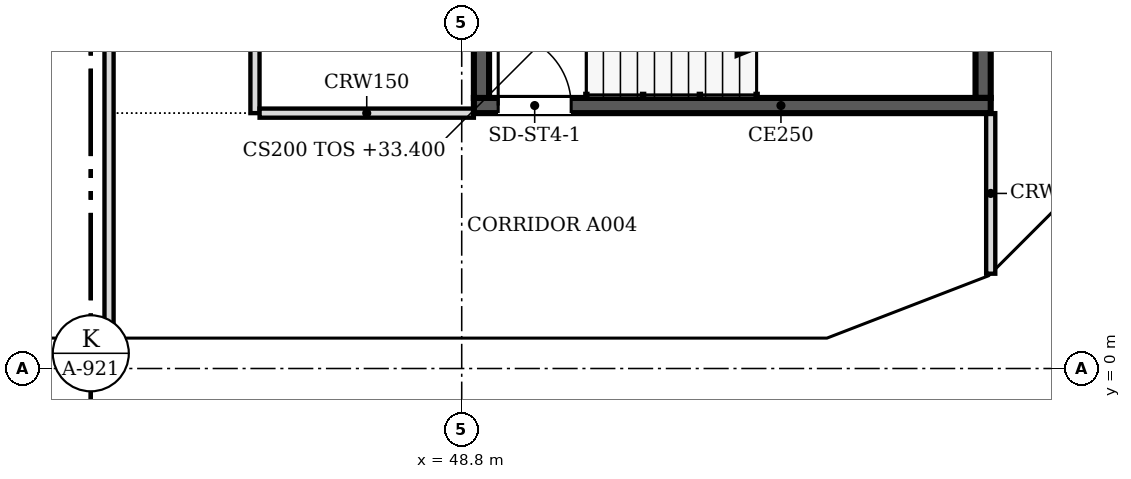
"""IFC4 building model, lengths in metres.
Left out: names, types, materials, properties, quantities, classifications, styles, units other than length and angle.
Written with IfcOpenShell. Run it as: python <this file> out.ifc"""

import sys

from ifc_helpers import new_model, si_unit, direction, frame, frame_2d, origin, place, context, subcontext, project, spatial, polyline, rectangle, outline, extrude, faceted_brep, source, transform, mapped, element, fill, save


model = new_model("IFC4")
c1 = context("Model", 3, precision=1e-05, world=origin(), true_north=direction((0.0, 1.0)))
c2 = subcontext(c1, "Body", "Model", "MODEL_VIEW")
j1 = project(units=[si_unit("LENGTHUNIT", "METRE"), si_unit("PLANEANGLEUNIT", "RADIAN")], contexts=[c1])
p1 = place(None, origin())
s1 = spatial("IfcSite", under=j1, at=p1, CompositionType="ELEMENT")
p2 = place(p1, origin())
s2 = spatial("IfcBuilding", under=s1, at=p2, CompositionType="ELEMENT")
p3 = place(p2, frame((0.0, 0.0, 33.4)))
s3 = spatial("IfcBuildingStorey", under=s2, at=p3, CompositionType="ELEMENT", Elevation=33.4)
m1 = source(origin(), c2, "Body", "SweptSolid", [
    extrude(outline(polyline([(3.05, 0.0), (6.1, 3.8), (3.05, 7.6), (0.0, 3.8), (3.05, 0.0)])), frame((0.0, 0.25, 0.0), z_axis=(0.0, -1.0, 0.0), x_axis=(1.0, 0.0, 0.0)), (0.0, 0.0, 1.0), 0.5),
])
p4 = place(p3, frame((39.65, 0.25, -3.8), z_axis=(0.0, 0.0, 1.0), x_axis=(1.0, 0.0, 0.0)))
e1 = element("IfcWall", 1, at=p4, inside=s3, PredefinedType="SOLIDWALL", context=c2, shape_type="MappedRepresentation", body=[
    mapped(m1, transform((0.0, 0.0, 0.0), scale=1.0)),
])
m2 = source(origin(), c2, "Body", "SweptSolid", [
    extrude(outline(polyline([(3.05, 0.399), (5.78, 3.8), (3.05, 7.2), (0.321, 3.8), (3.05, 0.399)])), frame((0.0, 0.26, 0.0), z_axis=(0.0, -1.0, 0.0), x_axis=(1.0, 0.0, 0.0)), (0.0, 0.0, 1.0), 0.52),
])
p5 = place(p4, origin())
e2 = element("IfcOpeningElement", 2, at=p5, cuts=e1, PredefinedType="OPENING", context=c2, shape_type="MappedRepresentation", body=[
    mapped(m2, transform((0.0, 0.0, 0.0), scale=1.0)),
])
p6 = place(p3, frame((45.75, 0.25, -3.8), z_axis=(0.0, 0.0, 1.0), x_axis=(1.0, 0.0, 0.0)))
e3 = element("IfcWall", 3, at=p6, inside=s3, PredefinedType="SOLIDWALL", context=c2, shape_type="MappedRepresentation", body=[
    mapped(m1, transform((0.0, 0.0, 0.0), scale=1.0)),
])
p7 = place(p6, origin())
e4 = element("IfcOpeningElement", 4, at=p7, cuts=e3, PredefinedType="OPENING", context=c2, shape_type="MappedRepresentation", body=[
    mapped(m2, transform((0.0, 0.0, 0.0), scale=1.0)),
])
m3 = source(origin(), c2, "Body", "Brep", [
    faceted_brep([(3.003, -0.25, 0.0), (3.05, -0.25, 0.06), (3.05, -0.25, 7.54), (3.003, -0.25, 7.6), (0.0, -0.25, 3.8), (0.0, 0.25, 3.8), (2.957, 0.25, 7.541), (2.957, 0.25, 0.059), (3.003, 0.0, 0.0), (3.003, 0.0, 7.6)], [[[0, 1, 2, 3, 4]], [[5, 6, 7]], [[1, 0, 8]], [[9, 3, 2]], [[6, 5, 4, 3, 9]], [[5, 7, 8, 0, 4]], [[1, 8, 7, 6, 9, 2]]]),
])
p8 = place(p3, frame((51.85, 0.25, -3.8), z_axis=(0.0, 0.0, 1.0), x_axis=(1.0, 0.0, 0.0)))
e5 = element("IfcWall", 5, at=p8, inside=s3, PredefinedType="SOLIDWALL", context=c2, shape_type="MappedRepresentation", body=[
    mapped(m3, transform((0.0, 0.0, 0.0), scale=1.0)),
])
m4 = source(origin(), c2, "Body", "SweptSolid", [
    extrude(outline(polyline([(2.803, 6.944), (0.319, 3.8), (2.803, 0.656), (2.803, 6.944)])), frame((0.0, 0.26, 0.0), z_axis=(0.0, -1.0, 0.0), x_axis=(1.0, 0.0, 0.0)), (0.0, 0.0, 1.0), 0.52),
])
p9 = place(p8, origin())
e6 = element("IfcOpeningElement", 6, at=p9, cuts=e5, PredefinedType="OPENING", context=c2, shape_type="MappedRepresentation", body=[
    mapped(m4, transform((0.0, 0.0, 0.0), scale=1.0)),
])
m5 = source(origin(), c2, "Body", "Brep", [
    faceted_brep([(0.047, -0.25, 0.0), (2.997, -0.25, 3.8), (0.047, -0.25, 7.6), (0.0, -0.25, 7.541), (0.0, -0.25, 0.059), (0.093, 0.25, 7.54), (2.944, 0.25, 3.868), (2.944, 0.25, 3.732), (0.093, 0.25, 0.06), (2.997, 0.0, 3.8), (0.047, 0.0, 0.0), (0.047, 0.0, 7.6)], [[[0, 1, 2, 3, 4]], [[5, 6, 7, 8]], [[8, 7, 9, 1, 0, 10]], [[6, 5, 11, 2, 1, 9]], [[3, 2, 11]], [[10, 0, 4]], [[8, 10, 4, 3, 11, 5]], [[9, 7, 6]]]),
])
p10 = place(p3, frame((54.81, 0.233, -3.8), z_axis=(0.0, 0.0, 1.0), x_axis=(0.932990326376, 0.359901446078, 0.0)))
e7 = element("IfcWall", 7, at=p10, inside=s3, PredefinedType="SOLIDWALL", context=c2, shape_type="MappedRepresentation", body=[
    mapped(m5, transform((0.0, 0.0, 0.0), scale=1.0)),
])
m6 = source(origin(), c2, "Body", "SweptSolid", [
    extrude(outline(polyline([(0.247, 0.665), (2.681, 3.8), (0.247, 6.935), (0.247, 0.665)])), frame((0.0, 0.26, 0.0), z_axis=(0.0, -1.0, 0.0), x_axis=(1.0, 0.0, 0.0)), (0.0, 0.0, 1.0), 0.52),
])
p11 = place(p10, origin())
e8 = element("IfcOpeningElement", 8, at=p11, cuts=e7, PredefinedType="OPENING", context=c2, shape_type="MappedRepresentation", body=[
    mapped(m6, transform((0.0, 0.0, 0.0), scale=1.0)),
])
m7 = source(origin(), c2, "Body", "Brep", [
    faceted_brep([(2.944, -0.25, 0.0), (2.997, -0.25, 0.068), (2.997, -0.25, 7.532), (2.944, -0.25, 7.6), (0.0, -0.25, 3.8), (0.053, 0.25, 3.868), (2.891, 0.25, 7.532), (2.891, 0.25, 0.068), (0.053, 0.25, 3.731), (2.944, 0.0, 0.0), (2.944, 0.0, 7.6), (0.0, 0.0, 3.8)], [[[0, 1, 2, 3, 4]], [[5, 6, 7, 8]], [[1, 0, 9]], [[10, 3, 2]], [[6, 5, 11, 4, 3, 10]], [[8, 7, 9, 0, 4, 11]], [[8, 11, 5]], [[1, 9, 7, 6, 10, 2]]]),
])
p12 = place(p3, frame((57.606, 1.312, -3.8), z_axis=(0.0, 0.0, 1.0), x_axis=(0.707147509625, 0.707066050402, 0.0)))
e9 = element("IfcWall", 9, at=p12, inside=s3, PredefinedType="SOLIDWALL", context=c2, shape_type="MappedRepresentation", body=[
    mapped(m7, transform((0.0, 0.0, 0.0), scale=1.0)),
])
m8 = source(origin(), c2, "Body", "SweptSolid", [
    extrude(outline(polyline([(2.744, 6.934), (0.316, 3.8), (2.744, 0.666), (2.744, 6.934)])), frame((0.0, 0.26, 0.0), z_axis=(0.0, -1.0, 0.0), x_axis=(1.0, 0.0, 0.0)), (0.0, 0.0, 1.0), 0.52),
])
p13 = place(p12, origin())
e10 = element("IfcOpeningElement", 10, at=p13, cuts=e9, PredefinedType="OPENING", context=c2, shape_type="MappedRepresentation", body=[
    mapped(m8, transform((0.0, 0.0, 0.0), scale=1.0)),
])
p14 = place(p2, frame((0.0, 0.0, 37.2)))
s4 = spatial("IfcBuildingStorey", under=s2, at=p14, CompositionType="ELEMENT", Elevation=37.2)
m9 = source(origin(), c2, "Body", "Brep", [
    faceted_brep([(3.05, -0.25, 0.0), (6.1, -0.25, 3.8), (6.1, -0.25, 3.8), (3.05, -0.25, 7.6), (0.0, -0.25, 3.8), (0.0, 0.25, 3.8), (3.05, 0.25, 7.6), (6.1, 0.25, 3.8), (6.1, 0.25, 3.8), (3.05, 0.25, 0.0)], [[[0, 1, 2, 3, 4]], [[5, 6, 7, 8, 9]], [[9, 8, 1, 0]], [[7, 6, 3, 2]], [[6, 5, 4, 3]], [[5, 9, 0, 4]], [[1, 8, 7, 2]]]),
])
p15 = place(p14, frame((36.6, 0.25, -3.8), z_axis=(0.0, 0.0, 1.0), x_axis=(1.0, 0.0, 0.0)))
e11 = element("IfcWall", 11, at=p15, inside=s4, PredefinedType="SOLIDWALL", context=c2, shape_type="MappedRepresentation", body=[
    mapped(m9, transform((0.0, 0.0, 0.0), scale=1.0)),
])
m10 = source(origin(), c2, "Body", "SweptSolid", [
    extrude(outline(polyline([(3.05, 0.399), (5.78, 3.8), (3.05, 7.201), (0.321, 3.8), (3.05, 0.399)])), frame((0.0, 0.26, 0.0), z_axis=(0.0, -1.0, 0.0), x_axis=(1.0, 0.0, 0.0)), (0.0, 0.0, 1.0), 0.52),
])
p16 = place(p15, origin())
e12 = element("IfcOpeningElement", 12, at=p16, cuts=e11, PredefinedType="OPENING", context=c2, shape_type="MappedRepresentation", body=[
    mapped(m10, transform((0.0, 0.0, 0.0), scale=1.0)),
])
m11 = source(origin(), c2, "Body", "SweptSolid", [
    extrude(outline(polyline([(3.05, 0.0), (6.1, 3.8), (3.05, 7.6), (0.0, 3.8), (3.05, 0.0)])), frame((0.0, 0.25, 0.0), z_axis=(0.0, -1.0, 0.0), x_axis=(1.0, 0.0, 0.0)), (0.0, 0.0, 1.0), 0.5),
])
p17 = place(p14, frame((42.7, 0.25, -3.8), z_axis=(0.0, 0.0, 1.0), x_axis=(1.0, 0.0, 0.0)))
e13 = element("IfcWall", 13, at=p17, inside=s4, PredefinedType="SOLIDWALL", context=c2, shape_type="MappedRepresentation", body=[
    mapped(m11, transform((0.0, 0.0, 0.0), scale=1.0)),
])
p18 = place(p17, origin())
e14 = element("IfcOpeningElement", 14, at=p18, cuts=e13, PredefinedType="OPENING", context=c2, shape_type="MappedRepresentation", body=[
    mapped(m10, transform((0.0, 0.0, 0.0), scale=1.0)),
])
m12 = source(origin(), c2, "Body", "Brep", [
    faceted_brep([(3.05, -0.25, 0.0), (6.053, -0.25, 3.8), (3.05, -0.25, 7.6), (0.0, -0.25, 3.8), (0.0, 0.25, 3.8), (3.05, 0.25, 7.6), (6.007, 0.25, 3.859), (6.007, 0.25, 3.741), (3.05, 0.25, 0.0), (6.053, 0.0, 3.8)], [[[0, 1, 2, 3]], [[4, 5, 6, 7, 8]], [[8, 7, 9, 1, 0]], [[6, 5, 2, 1, 9]], [[5, 4, 3, 2]], [[4, 8, 0, 3]], [[9, 7, 6]]]),
])
p19 = place(p14, frame((48.8, 0.25, -3.8), z_axis=(0.0, 0.0, 1.0), x_axis=(1.0, 0.0, 0.0)))
e15 = element("IfcWall", 15, at=p19, inside=s4, PredefinedType="SOLIDWALL", context=c2, shape_type="MappedRepresentation", body=[
    mapped(m12, transform((0.0, 0.0, 0.0), scale=1.0)),
])
m13 = source(origin(), c2, "Body", "SweptSolid", [
    extrude(outline(polyline([(3.049, 0.401), (5.735, 3.8), (3.049, 7.199), (0.321, 3.8), (3.049, 0.401)])), frame((0.0, 0.26, 0.0), z_axis=(0.0, -1.0, 0.0), x_axis=(1.0, 0.0, 0.0)), (0.0, 0.0, 1.0), 0.52),
])
p20 = place(p19, origin())
e16 = element("IfcOpeningElement", 16, at=p20, cuts=e15, PredefinedType="OPENING", context=c2, shape_type="MappedRepresentation", body=[
    mapped(m13, transform((0.0, 0.0, 0.0), scale=1.0)),
])
m14 = source(origin(), c2, "Body", "Brep", [
    faceted_brep([(2.95, -0.25, 0.0), (3.003, -0.25, 0.068), (3.003, -0.25, 7.532), (2.95, -0.25, 7.6), (0.0, -0.25, 3.8), (0.047, 0.25, 3.86), (2.898, 0.25, 7.532), (2.898, 0.25, 0.068), (0.047, 0.25, 3.74), (2.95, 0.0, 0.0), (2.95, 0.0, 7.6), (0.0, 0.0, 3.8)], [[[0, 1, 2, 3, 4]], [[5, 6, 7, 8]], [[1, 0, 9]], [[10, 3, 2]], [[6, 5, 11, 4, 3, 10]], [[8, 7, 9, 0, 4, 11]], [[8, 11, 5]], [[1, 9, 7, 6, 10, 2]]]),
])
p21 = place(p14, frame((54.854, 0.25, -3.8), z_axis=(0.0, 0.0, 1.0), x_axis=(0.932970071518, 0.359953949349, 0.0)))
e17 = element("IfcWall", 17, at=p21, inside=s4, PredefinedType="SOLIDWALL", context=c2, shape_type="MappedRepresentation", body=[
    mapped(m14, transform((0.0, 0.0, 0.0), scale=1.0)),
])
m15 = source(origin(), c2, "Body", "SweptSolid", [
    extrude(outline(polyline([(2.75, 6.935), (0.316, 3.8), (2.75, 0.665), (2.75, 6.935)])), frame((0.0, 0.26, 0.0), z_axis=(0.0, -1.0, 0.0), x_axis=(1.0, 0.0, 0.0)), (0.0, 0.0, 1.0), 0.52),
])
p22 = place(p21, origin())
e18 = element("IfcOpeningElement", 18, at=p22, cuts=e17, PredefinedType="OPENING", context=c2, shape_type="MappedRepresentation", body=[
    mapped(m15, transform((0.0, 0.0, 0.0), scale=1.0)),
])
m16 = source(origin(), c2, "Body", "Brep", [
    faceted_brep([(0.053, -0.25, 0.0), (2.997, -0.25, 3.8), (0.053, -0.25, 7.6), (0.0, -0.25, 7.532), (0.0, -0.25, 0.068), (0.106, 0.25, 7.532), (2.944, 0.25, 3.868), (2.944, 0.25, 3.732), (0.106, 0.25, 0.068), (2.997, 0.0, 3.8), (0.053, 0.0, 0.0), (0.053, 0.0, 7.6)], [[[0, 1, 2, 3, 4]], [[5, 6, 7, 8]], [[8, 7, 9, 1, 0, 10]], [[6, 5, 11, 2, 1, 9]], [[3, 2, 11]], [[10, 0, 4]], [[8, 10, 4, 3, 11, 5]], [[9, 7, 6]]]),
])
p23 = place(p14, frame((57.569, 1.274, -3.8), z_axis=(0.0, 0.0, 1.0), x_axis=(0.707066050402, 0.707147509625, 0.0)))
e19 = element("IfcWall", 19, at=p23, inside=s4, PredefinedType="SOLIDWALL", context=c2, shape_type="MappedRepresentation", body=[
    mapped(m16, transform((0.0, 0.0, 0.0), scale=1.0)),
])
m17 = source(origin(), c2, "Body", "SweptSolid", [
    extrude(outline(polyline([(0.253, 0.667), (2.681, 3.8), (0.253, 6.934), (0.253, 0.667)])), frame((0.0, 0.26, 0.0), z_axis=(0.0, -1.0, 0.0), x_axis=(1.0, 0.0, 0.0)), (0.0, 0.0, 1.0), 0.52),
])
p24 = place(p23, origin())
e20 = element("IfcOpeningElement", 20, at=p24, cuts=e19, PredefinedType="OPENING", context=c2, shape_type="MappedRepresentation", body=[
    mapped(m17, transform((0.0, 0.0, 0.0), scale=1.0)),
])
p25 = place(p3, frame((57.5, 4.325, 0.0), z_axis=(0.0, 0.0, 1.0), x_axis=(-1.0, 0.0, 0.0)))
e21 = element("IfcWall", 21, at=p25, inside=s3, PredefinedType="SOLIDWALL", context=c2, shape_type="SweptSolid", body=[
    extrude(rectangle(XDim=8.5, YDim=0.25, at=frame_2d((4.25, 0.0))), origin(), (0.0, 0.0, 1.0), 3.8),
])
m18 = source(origin(), c2, "Body", "SweptSolid", [
    extrude(rectangle(XDim=1.2, YDim=2.1, at=frame_2d((0.6, 1.05))), frame((0.0, 0.135, 0.0), z_axis=(0.0, -1.0, 0.0), x_axis=(1.0, 0.0, 0.0)), (0.0, 0.0, 1.0), 0.27),
])
p26 = place(p25, frame((6.9, 0.0, 0.0)))
e22 = element("IfcOpeningElement", 22, at=p26, cuts=e21, PredefinedType="OPENING", context=c2, shape_type="MappedRepresentation", body=[
    mapped(m18, transform((0.0, 0.0, 0.0), scale=1.0)),
])
for number, where, z_axis, x_axis in (
    (23, (49.125, 4.45, 0.0), (0.0, 0.0, 1.0), (0.0, 1.0, 0.0)),
    (24, (57.375, 7.85, 0.0), (0.0, 0.0, 1.0), (0.0, -1.0, 0.0)),
):
    element("IfcWall", number, at=place(p3, frame(where, z_axis=z_axis, x_axis=x_axis)), inside=s3, PredefinedType="SOLIDWALL", context=c2, shape_type="SweptSolid", body=[
        extrude(rectangle(XDim=3.4, YDim=0.25, at=frame_2d((1.7, 0.0))), origin(), (0.0, 0.0, 1.0), 3.8),
    ])
p27 = place(p3, frame((43.0, 0.5, 0.0), z_axis=(0.0, 0.0, 1.0), x_axis=(0.0, 1.0, 0.0)))
e25 = element("IfcWall", 25, at=p27, inside=s3, PredefinedType="PARTITIONING", context=c2, shape_type="SweptSolid", body=[
    extrude(rectangle(XDim=21.424, YDim=0.15, at=frame_2d((10.712, 0.0))), origin(), (0.0, 0.0, 1.0), 3.067),
])
m19 = source(origin(), c2, "Body", "SweptSolid", [
    extrude(rectangle(XDim=0.9, YDim=2.1, at=frame_2d((0.45, 1.05))), frame((0.0, 0.085, 0.0), z_axis=(0.0, -1.0, 0.0), x_axis=(1.0, 0.0, 0.0)), (0.0, 0.0, 1.0), 0.17),
])
p28 = place(p27, frame((6.2, 0.0, 0.0)))
e26 = element("IfcOpeningElement", 26, at=p28, cuts=e25, PredefinedType="OPENING", context=c2, shape_type="MappedRepresentation", body=[
    mapped(m19, transform((0.0, 0.0, 0.0), scale=1.0)),
])
p29 = place(p27, frame((15.1, 0.0, 0.0)))
e27 = element("IfcOpeningElement", 27, at=p29, cuts=e25, PredefinedType="OPENING", context=c2, shape_type="MappedRepresentation", body=[
    mapped(m19, transform((0.0, 0.0, 0.0), scale=1.0)),
])
p30 = place(p3, frame((57.5, 1.559, 0.0), z_axis=(0.0, 0.0, 1.0), x_axis=(0.0, 1.0, 0.0)))
e28 = element("IfcWall", 28, at=p30, inside=s3, PredefinedType="PARTITIONING", context=c2, shape_type="SweptSolid", body=[
    extrude(rectangle(XDim=2.641, YDim=0.15, at=frame_2d((1.32, 0.0))), origin(), (0.0, 0.0, 1.0), 3.067),
])
p31 = place(p3, frame((45.4, 22.0, 0.0), z_axis=(0.0, 0.0, 1.0), x_axis=(0.0, -1.0, 0.0)))
e29 = element("IfcWall", 29, at=p31, inside=s3, PredefinedType="PARTITIONING", context=c2, shape_type="SweptSolid", body=[
    extrude(rectangle(XDim=17.8, YDim=0.15, at=frame_2d((8.9, 0.0))), origin(), (0.0, 0.0, 1.0), 3.067),
])
m20 = source(origin(), c2, "Body", "SweptSolid", [
    extrude(rectangle(XDim=1.0, YDim=2.1, at=frame_2d((0.5, 1.05))), frame((0.0, 0.085, 0.0), z_axis=(0.0, -1.0, 0.0), x_axis=(1.0, 0.0, 0.0)), (0.0, 0.0, 1.0), 0.17),
])
p32 = place(p31, frame((1.999, 0.0, 0.0)))
e30 = element("IfcOpeningElement", 30, at=p32, cuts=e29, PredefinedType="OPENING", context=c2, shape_type="MappedRepresentation", body=[
    mapped(m20, transform((0.0, 0.0, 0.0), scale=1.0)),
])
p33 = place(p31, frame((10.9, 0.0, 0.0)))
e31 = element("IfcOpeningElement", 31, at=p33, cuts=e29, PredefinedType="OPENING", context=c2, shape_type="MappedRepresentation", body=[
    mapped(m20, transform((0.0, 0.0, 0.0), scale=1.0)),
])
p34 = place(p3, frame((45.476, 4.2, 0.0), z_axis=(0.0, 0.0, 1.0), x_axis=(1.0, 0.0, 0.0)))
e32 = element("IfcWall", 32, at=p34, inside=s3, PredefinedType="PARTITIONING", context=c2, shape_type="SweptSolid", body=[
    extrude(rectangle(XDim=3.524, YDim=0.15, at=frame_2d((1.762, 0.0))), origin(), (0.0, 0.0, 1.0), 3.067),
])
m21 = source(origin(), c2, "Body", "SweptSolid", [
    extrude(rectangle(XDim=1.2, YDim=2.1, at=frame_2d((0.6, 1.05))), frame((0.0, 0.025, 0.0), z_axis=(0.0, -1.0, 0.0), x_axis=(1.0, 0.0, 0.0)), (0.0, 0.0, 1.0), 0.05),
])
p35 = place(p26, origin())
e33 = element("IfcDoor", 33, at=p35, inside=s3, OperationType="SINGLE_SWING_RIGHT", PredefinedType="DOOR", context=c2, shape_type="MappedRepresentation", body=[
    mapped(m21, transform((0.0, 0.0, 0.0), scale=1.0)),
])
fill(e22, e33)
save(model, sys.argv[1])
